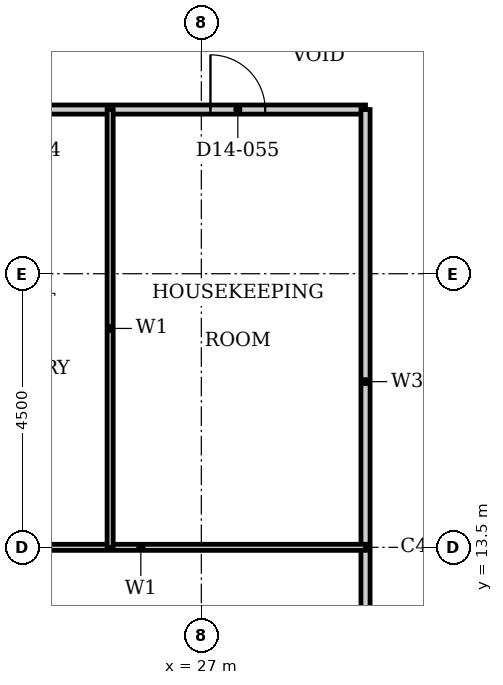
"""IFC4 building model, lengths in metres.
Left out: names, types, materials, properties, quantities, classifications, styles, units other than length and angle.
Written with IfcOpenShell. Run it as: python <this file> out.ifc"""

import sys

from ifc_helpers import new_model, si_unit, direction, frame, frame_2d, origin, place, context, subcontext, project, spatial, rectangle, extrude, element, fill, save


model = new_model("IFC4")
c1 = context("Model", 3, precision=1e-05, world=origin(), true_north=direction((0.0, 1.0)))
c2 = subcontext(c1, "Body", "Model", "MODEL_VIEW")
j1 = project(units=[si_unit("LENGTHUNIT", "METRE"), si_unit("PLANEANGLEUNIT", "RADIAN")], contexts=[c1])
p1 = place(None, origin())
s1 = spatial("IfcSite", under=j1, at=p1, CompositionType="ELEMENT")
p2 = place(p1, origin())
s2 = spatial("IfcBuilding", under=s1, at=p2, CompositionType="ELEMENT")
p3 = place(p2, frame((0.0, 0.0, 63.6)))
s3 = spatial("IfcBuildingStorey", under=s2, at=p3, CompositionType="ELEMENT", Elevation=63.6)
p4 = place(p3, frame((16.2, 20.7, 0.0), z_axis=(0.0, 0.0, 1.0), x_axis=(1.0, 0.0, 0.0)))
e1 = element("IfcWall", 1, at=p4, inside=s3, PredefinedType="PARTITIONING", context=c2, shape_type="SweptSolid", body=[
    extrude(rectangle(XDim=13.5, YDim=0.15, at=frame_2d((6.75, 0.0))), origin(), (0.0, 0.0, 1.0), 3.3),
])
p5 = place(p4, frame((4.75, 0.0, 0.0)))
e2 = element("IfcOpeningElement", 2, at=p5, cuts=e1, PredefinedType="OPENING", context=c2, shape_type="SweptSolid", body=[
    extrude(rectangle(XDim=1.0, YDim=2.1, at=frame_2d((0.5, 1.05))), frame((0.0, 0.085, 0.0), z_axis=(0.0, -1.0, 0.0), x_axis=(1.0, 0.0, 0.0)), (0.0, 0.0, 1.0), 0.17),
])
p6 = place(p4, frame((0.45, 0.0, 0.0)))
e3 = element("IfcOpeningElement", 3, at=p6, cuts=e1, PredefinedType="OPENING", context=c2, shape_type="SweptSolid", body=[
    extrude(rectangle(XDim=0.9, YDim=2.1, at=frame_2d((0.45, 1.05))), frame((0.0, 0.085, 0.0), z_axis=(0.0, -1.0, 0.0), x_axis=(1.0, 0.0, 0.0)), (0.0, 0.0, 1.0), 0.17),
])
p7 = place(p4, frame((7.35, 0.0, 0.0)))
e4 = element("IfcOpeningElement", 4, at=p7, cuts=e1, PredefinedType="OPENING", context=c2, shape_type="SweptSolid", body=[
    extrude(rectangle(XDim=0.9, YDim=2.1, at=frame_2d((0.45, 1.05))), frame((0.0, 0.085, 0.0), z_axis=(0.0, -1.0, 0.0), x_axis=(1.0, 0.0, 0.0)), (0.0, 0.0, 1.0), 0.17),
])
p8 = place(p4, frame((10.95, 0.0, 0.0)))
e5 = element("IfcOpeningElement", 5, at=p8, cuts=e1, PredefinedType="OPENING", context=c2, shape_type="SweptSolid", body=[
    extrude(rectangle(XDim=0.9, YDim=2.1, at=frame_2d((0.45, 1.05))), frame((0.0, 0.085, 0.0), z_axis=(0.0, -1.0, 0.0), x_axis=(1.0, 0.0, 0.0)), (0.0, 0.0, 1.0), 0.17),
])
p9 = place(p3, frame((29.7, 4.5, 0.0), z_axis=(0.0, 0.0, 1.0), x_axis=(0.0, 1.0, 0.0)))
e6 = element("IfcWall", 6, at=p9, inside=s3, PredefinedType="PARTITIONING", context=c2, shape_type="SweptSolid", body=[
    extrude(rectangle(XDim=16.2, YDim=0.15, at=frame_2d((8.1, 0.0))), origin(), (0.0, 0.0, 1.0), 3.3),
])
p10 = place(p9, frame((6.25, 0.0, 0.0)))
e7 = element("IfcOpeningElement", 7, at=p10, cuts=e6, PredefinedType="OPENING", context=c2, shape_type="SweptSolid", body=[
    extrude(rectangle(XDim=1.0, YDim=2.1, at=frame_2d((0.5, 1.05))), frame((0.0, 0.085, 0.0), z_axis=(0.0, -1.0, 0.0), x_axis=(1.0, 0.0, 0.0)), (0.0, 0.0, 1.0), 0.17),
])
p11 = place(p3, frame((22.31, 13.5, 0.0), z_axis=(0.0, 0.0, 1.0), x_axis=(1.0, 0.0, 0.0)))
e8 = element("IfcWall", 8, at=p11, inside=s3, PredefinedType="PARTITIONING", context=c2, shape_type="SweptSolid", body=[
    extrude(rectangle(XDim=7.39, YDim=0.1, at=frame_2d((3.695, 0.0))), origin(), (0.0, 0.0, 1.0), 2.38),
])
p12 = place(p3, frame((25.5, 13.5, 0.0), z_axis=(0.0, 0.0, 1.0), x_axis=(0.0, 1.0, 0.0)))
e9 = element("IfcWall", 9, at=p12, inside=s3, PredefinedType="PARTITIONING", context=c2, shape_type="SweptSolid", body=[
    extrude(rectangle(XDim=7.2, YDim=0.1, at=frame_2d((3.6, 0.0))), origin(), (0.0, 0.0, 1.0), 3.3),
])
p13 = place(p8, origin())
e10 = element("IfcDoor", 10, at=p13, inside=s3, OperationType="SINGLE_SWING_RIGHT", PredefinedType="DOOR", context=c2, shape_type="SweptSolid", body=[
    extrude(rectangle(XDim=0.9, YDim=2.1, at=frame_2d((0.45, 1.05))), frame((0.0, 0.025, 0.0), z_axis=(0.0, -1.0, 0.0), x_axis=(1.0, 0.0, 0.0)), (0.0, 0.0, 1.0), 0.05),
])
fill(e5, e10)
save(model, sys.argv[1])
